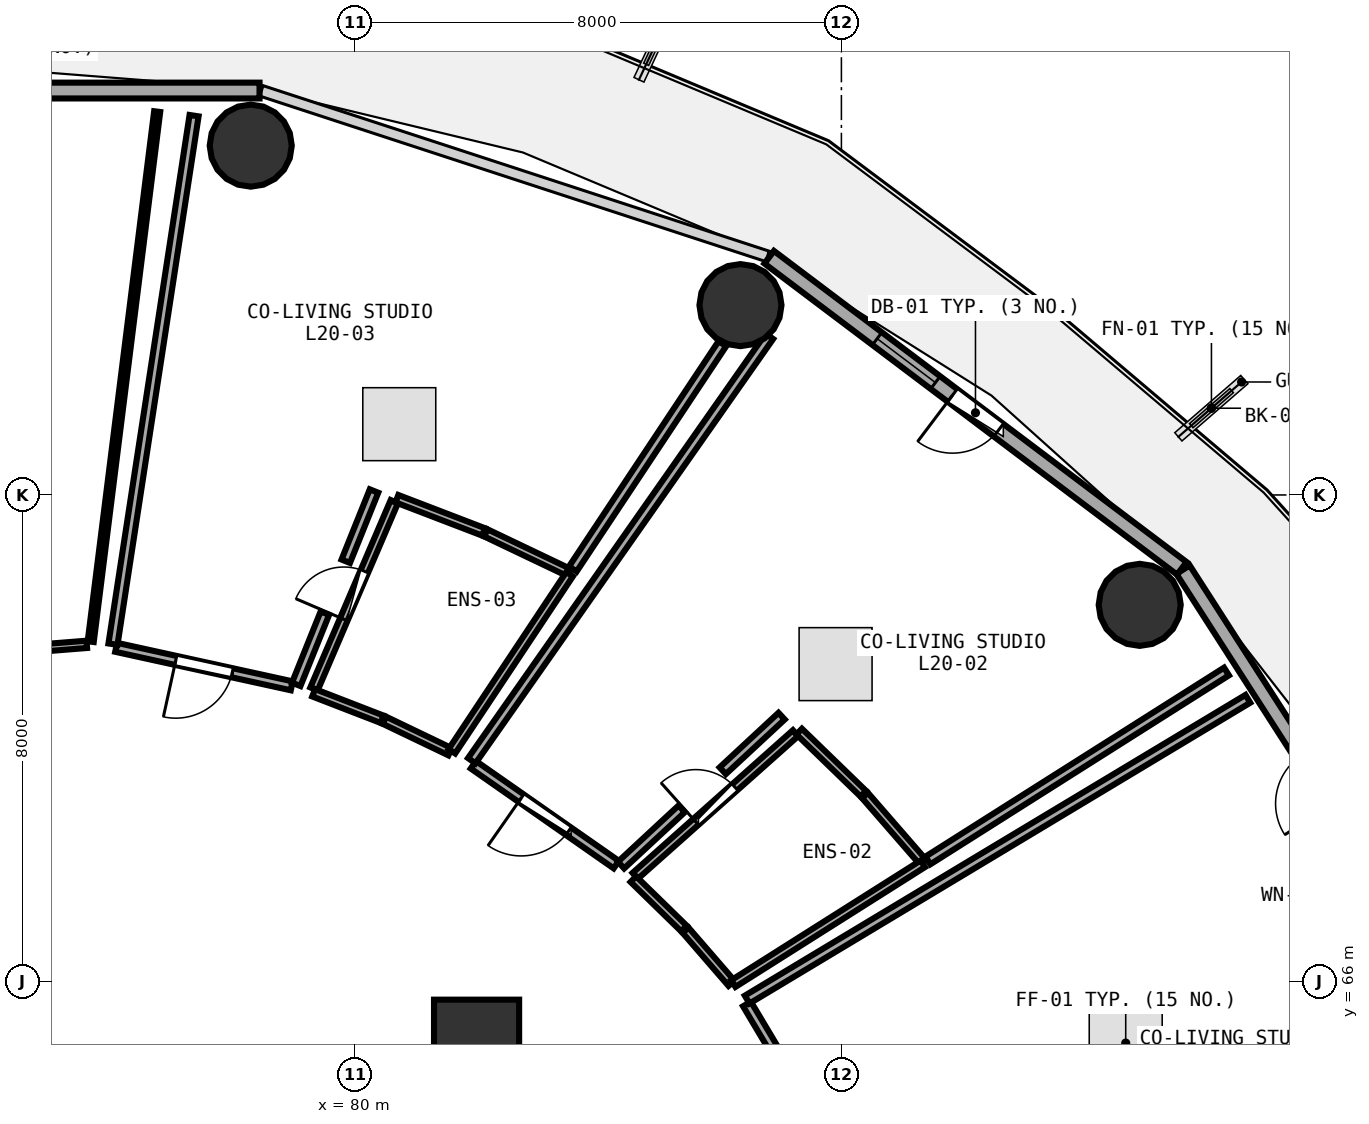
"""IFC4 building model, lengths in metres.
Left out: names, types, materials, properties, quantities, classifications, styles, units other than length and angle.
Written with IfcOpenShell. Run it as: python <this file> out.ifc"""

import sys

from ifc_helpers import new_model, si_unit, direction, frame, frame_2d, origin, origin_2d, place, context, subcontext, project, spatial, rectangle, circle, extrude, element, fill, save


model = new_model("IFC4")
c1 = context("Model", 3, precision=1e-05, world=origin(), true_north=direction((0.0, 1.0)))
c2 = subcontext(c1, "Body", "Model", "MODEL_VIEW")
j1 = project(units=[si_unit("LENGTHUNIT", "METRE"), si_unit("PLANEANGLEUNIT", "RADIAN")], contexts=[c1])
p1 = place(None, origin())
s1 = spatial("IfcSite", under=j1, at=p1, CompositionType="ELEMENT")
p2 = place(p1, origin())
s2 = spatial("IfcBuilding", under=s1, at=p2, CompositionType="ELEMENT")
p3 = place(p2, frame((0.0, 0.0, 80.1)))
s3 = spatial("IfcBuildingStorey", under=s2, at=p3, CompositionType="ELEMENT", Elevation=80.1)
p4 = place(p3, frame((82.0, 65.0, 0.0), z_axis=(0.0, 0.0, 1.0), x_axis=(1.0, 0.0, 0.0)))
e1 = element("IfcColumn", 1, at=p4, inside=s3, PredefinedType="PILASTER", context=c2, shape_type="SweptSolid", body=[
    extrude(rectangle(XDim=1.4, YDim=1.4, at=origin_2d()), origin(), (0.0, 0.0, 1.0), 3.75),
])
for number, where, z_axis, x_axis in (
    (2, (92.906, 72.193, 0.0), (0.0, 0.0, 1.0), (1.0, 0.0, 0.0)),
    (3, (86.34, 77.122, 0.0), (0.0, 0.0, 1.0), (1.0, 0.0, 0.0)),
    (4, (78.286, 79.745, 0.0), (0.0, 0.0, 1.0), (1.0, 0.0, 0.0)),
):
    element("IfcColumn", number, at=place(p3, frame(where, z_axis=z_axis, x_axis=x_axis)), inside=s3, PredefinedType="COLUMN", context=c2, shape_type="SweptSolid", body=[
        extrude(circle(Radius=0.675, at=origin_2d()), origin(), (0.0, 0.0, 1.0), 3.75),
    ])
p5 = place(p3, frame((98.048, 65.879, 0.0), z_axis=(0.0, 0.0, 1.0), x_axis=(-0.540620528459, 0.841266571432, 0.0)))
e5 = element("IfcWall", 5, at=p5, inside=s3, PredefinedType="SOLIDWALL", context=c2, shape_type="SweptSolid", body=[
    extrude(rectangle(XDim=8.193, YDim=0.26, at=frame_2d((4.096, 0.0))), origin(), (0.0, 0.0, 1.0), 3.475),
])
p6 = place(p5, frame((3.621, 0.0, 0.0)))
e6 = element("IfcOpeningElement", 6, at=p6, cuts=e5, PredefinedType="OPENING", context=c2, shape_type="SweptSolid", body=[
    extrude(rectangle(XDim=0.95, YDim=2.1, at=frame_2d((0.475, 1.05))), frame((0.0, 0.14, 0.0), z_axis=(0.0, -1.0, 0.0), x_axis=(1.0, 0.0, 0.0)), (0.0, 0.0, 1.0), 0.28),
])
p7 = place(p5, frame((2.041, 0.0, 0.85)))
e7 = element("IfcOpeningElement", 7, at=p7, cuts=e5, PredefinedType="OPENING", context=c2, shape_type="SweptSolid", body=[
    extrude(rectangle(XDim=1.2, YDim=1.45, at=frame_2d((0.6, 0.725))), frame((0.0, 0.14, 0.0), z_axis=(0.0, -1.0, 0.0), x_axis=(1.0, 0.0, 0.0)), (0.0, 0.0, 1.0), 0.28),
])
p8 = place(p3, frame((93.599, 72.793, 0.0), z_axis=(0.0, 0.0, 1.0), x_axis=(-0.798501507879, 0.601992808857, 0.0)))
e8 = element("IfcWall", 8, at=p8, inside=s3, PredefinedType="SOLIDWALL", context=c2, shape_type="SweptSolid", body=[
    extrude(rectangle(XDim=8.499, YDim=0.26, at=frame_2d((4.25, 0.0))), origin(), (0.0, 0.0, 1.0), 3.475),
])
p9 = place(p8, frame((3.775, 0.0, 0.0)))
e9 = element("IfcOpeningElement", 9, at=p9, cuts=e8, PredefinedType="OPENING", context=c2, shape_type="SweptSolid", body=[
    extrude(rectangle(XDim=0.95, YDim=2.1, at=frame_2d((0.475, 1.05))), frame((0.0, 0.14, 0.0), z_axis=(0.0, -1.0, 0.0), x_axis=(1.0, 0.0, 0.0)), (0.0, 0.0, 1.0), 0.28),
])
p10 = place(p8, frame((5.075, 0.0, 0.85)))
e10 = element("IfcOpeningElement", 10, at=p10, cuts=e8, PredefinedType="OPENING", context=c2, shape_type="SweptSolid", body=[
    extrude(rectangle(XDim=1.2, YDim=1.45, at=frame_2d((0.6, 0.725))), frame((0.0, 0.14, 0.0), z_axis=(0.0, -1.0, 0.0), x_axis=(1.0, 0.0, 0.0)), (0.0, 0.0, 1.0), 0.28),
])
p11 = place(p3, frame((78.43, 80.651, 0.0), z_axis=(0.0, 0.0, 1.0), x_axis=(-1.0, 0.0, 0.0)))
e11 = element("IfcWall", 11, at=p11, inside=s3, PredefinedType="SOLIDWALL", context=c2, shape_type="SweptSolid", body=[
    extrude(rectangle(XDim=8.861, YDim=0.26, at=frame_2d((4.43, 0.0))), origin(), (0.0, 0.0, 1.0), 3.475),
])
p12 = place(p11, frame((3.63, 0.0, 0.85)))
e12 = element("IfcOpeningElement", 12, at=p12, cuts=e11, PredefinedType="OPENING", context=c2, shape_type="SweptSolid", body=[
    extrude(rectangle(XDim=1.6, YDim=1.45, at=frame_2d((0.8, 0.725))), frame((0.0, 0.14, 0.0), z_axis=(0.0, -1.0, 0.0), x_axis=(1.0, 0.0, 0.0)), (0.0, 0.0, 1.0), 0.28),
])
p13 = place(p3, frame((87.856, 63.267, 0.0), z_axis=(0.0, 0.0, 1.0), x_axis=(-0.512288635556, 0.858813340535, 0.0)))
e13 = element("IfcWall", 13, at=p13, inside=s3, PredefinedType="PARTITIONING", context=c2, shape_type="SweptSolid", body=[
    extrude(rectangle(XDim=2.751, YDim=0.15, at=frame_2d((1.375, 0.0))), origin(), (0.0, 0.0, 1.0), 2.925),
])
p14 = place(p13, frame((0.901, 0.0, 0.0)))
e14 = element("IfcOpeningElement", 14, at=p14, cuts=e13, PredefinedType="OPENING", context=c2, shape_type="SweptSolid", body=[
    extrude(rectangle(XDim=0.95, YDim=2.08, at=frame_2d((0.475, 1.04))), frame((0.0, 0.085, 0.0), z_axis=(0.0, -1.0, 0.0), x_axis=(1.0, 0.0, 0.0)), (0.0, 0.0, 1.0), 0.17),
])
p15 = place(p3, frame((84.609, 67.736, 0.0), z_axis=(0.0, 0.0, 1.0), x_axis=(0.746989483068, 0.664835853565, 0.0)))
e15 = element("IfcWall", 15, at=p15, inside=s3, PredefinedType="PLUMBINGWALL", context=c2, shape_type="SweptSolid", body=[
    extrude(rectangle(XDim=3.531, YDim=0.13, at=frame_2d((1.765, 0.0))), origin(), (0.0, 0.0, 1.0), 3.175),
])
p16 = place(p15, frame((1.335, 0.0, 0.0)))
e16 = element("IfcOpeningElement", 16, at=p16, cuts=e15, PredefinedType="OPENING", context=c2, shape_type="SweptSolid", body=[
    extrude(rectangle(XDim=0.86, YDim=2.05, at=frame_2d((0.43, 1.025))), frame((0.0, 0.075, 0.0), z_axis=(0.0, -1.0, 0.0), x_axis=(1.0, 0.0, 0.0)), (0.0, 0.0, 1.0), 0.15),
])
p17 = place(p3, frame((84.298, 67.92, 0.0), z_axis=(0.0, 0.0, 1.0), x_axis=(-0.819775565256, 0.572684924378, 0.0)))
e17 = element("IfcWall", 17, at=p17, inside=s3, PredefinedType="PARTITIONING", context=c2, shape_type="SweptSolid", body=[
    extrude(rectangle(XDim=2.867, YDim=0.15, at=frame_2d((1.434, 0.0))), origin(), (0.0, 0.0, 1.0), 2.925),
])
p18 = place(p17, frame((0.959, 0.0, 0.0)))
e18 = element("IfcOpeningElement", 18, at=p18, cuts=e17, PredefinedType="OPENING", context=c2, shape_type="SweptSolid", body=[
    extrude(rectangle(XDim=0.95, YDim=2.08, at=frame_2d((0.475, 1.04))), frame((0.0, 0.085, 0.0), z_axis=(0.0, -1.0, 0.0), x_axis=(1.0, 0.0, 0.0)), (0.0, 0.0, 1.0), 0.17),
])
p19 = place(p3, frame((79.326, 70.809, 0.0), z_axis=(0.0, 0.0, 1.0), x_axis=(0.394174106006, 0.919035785024, 0.0)))
e19 = element("IfcWall", 19, at=p19, inside=s3, PredefinedType="PLUMBINGWALL", context=c2, shape_type="SweptSolid", body=[
    extrude(rectangle(XDim=3.353, YDim=0.13, at=frame_2d((1.677, 0.0))), origin(), (0.0, 0.0, 1.0), 2.925),
])
p20 = place(p19, frame((1.247, 0.0, 0.0)))
e20 = element("IfcOpeningElement", 20, at=p20, cuts=e19, PredefinedType="OPENING", context=c2, shape_type="SweptSolid", body=[
    extrude(rectangle(XDim=0.86, YDim=2.05, at=frame_2d((0.43, 1.025))), frame((0.0, 0.075, 0.0), z_axis=(0.0, -1.0, 0.0), x_axis=(1.0, 0.0, 0.0)), (0.0, 0.0, 1.0), 0.15),
])
p21 = place(p3, frame((78.96, 70.861, 0.0), z_axis=(0.0, 0.0, 1.0), x_axis=(-0.976789452363, 0.214201694093, 0.0)))
e21 = element("IfcWall", 21, at=p21, inside=s3, PredefinedType="PARTITIONING", context=c2, shape_type="SweptSolid", body=[
    extrude(rectangle(XDim=2.957, YDim=0.15, at=frame_2d((1.478, 0.0))), origin(), (0.0, 0.0, 1.0), 3.48),
])
p22 = place(p21, frame((1.003, 0.0, 0.0)))
e22 = element("IfcOpeningElement", 22, at=p22, cuts=e21, PredefinedType="OPENING", context=c2, shape_type="SweptSolid", body=[
    extrude(rectangle(XDim=0.95, YDim=2.08, at=frame_2d((0.475, 1.04))), frame((0.0, 0.085, 0.0), z_axis=(0.0, -1.0, 0.0), x_axis=(1.0, 0.0, 0.0)), (0.0, 0.0, 1.0), 0.17),
])
p23 = place(p3, frame((75.589, 71.543, 0.0), z_axis=(0.0, 0.0, 1.0), x_axis=(-0.996863165686, -0.079144354814, 0.0)))
e23 = element("IfcWall", 23, at=p23, inside=s3, PredefinedType="PARTITIONING", context=c2, shape_type="SweptSolid", body=[
    extrude(rectangle(XDim=5.765, YDim=0.12, at=frame_2d((2.883, 0.0))), origin(), (0.0, 0.0, 1.0), 2.925),
])
p24 = place(p23, frame((2.433, 0.0, 0.0)))
e24 = element("IfcOpeningElement", 24, at=p24, cuts=e23, PredefinedType="OPENING", context=c2, shape_type="SweptSolid", body=[
    extrude(rectangle(XDim=0.9, YDim=2.08, at=frame_2d((0.45, 1.04))), frame((0.0, 0.07, 0.0), z_axis=(0.0, -1.0, 0.0), x_axis=(1.0, 0.0, 0.0)), (0.0, 0.0, 1.0), 0.14),
])
p25 = place(p3, frame((86.45, 65.702, 0.0), z_axis=(0.0, 0.0, 1.0), x_axis=(0.857261851198, 0.514880683731, 0.0)))
e25 = element("IfcWall", 25, at=p25, inside=s3, PredefinedType="PARTITIONING", context=c2, shape_type="SweptSolid", body=[
    extrude(rectangle(XDim=9.606, YDim=0.15, at=frame_2d((4.803, 0.0))), origin(), (0.0, 0.0, 1.0), 2.975),
])
p26 = place(p3, frame((86.193, 65.969, 0.0), z_axis=(0.0, 0.0, 1.0), x_axis=(-0.654583900851, 0.755989362853, 0.0)))
e26 = element("IfcWall", 26, at=p26, inside=s3, PredefinedType="PLUMBINGWALL", context=c2, shape_type="SweptSolid", body=[
    extrude(rectangle(XDim=1.153, YDim=0.13, at=frame_2d((0.577, 0.0))), origin(), (0.0, 0.0, 1.0), 3.48),
])
p27 = place(p3, frame((85.411, 66.87, 0.0), z_axis=(0.0, 0.0, 1.0), x_axis=(-0.715871547002, 0.698232001696, 0.0)))
e27 = element("IfcWall", 27, at=p27, inside=s3, PredefinedType="PLUMBINGWALL", context=c2, shape_type="SweptSolid", body=[
    extrude(rectangle(XDim=1.163, YDim=0.13, at=frame_2d((0.581, 0.0))), origin(), (0.0, 0.0, 1.0), 2.925),
])
p28 = place(p3, frame((87.305, 70.109, 0.0), z_axis=(0.0, 0.0, 1.0), x_axis=(0.718235032224, -0.69580057379, 0.0)))
e28 = element("IfcWall", 28, at=p28, inside=s3, PredefinedType="PLUMBINGWALL", context=c2, shape_type="SweptSolid", body=[
    extrude(rectangle(XDim=1.469, YDim=0.13, at=frame_2d((0.735, 0.0))), origin(), (0.0, 0.0, 1.0), 2.925),
])
p29 = place(p3, frame((88.388, 69.058, 0.0), z_axis=(0.0, 0.0, 1.0), x_axis=(0.656315808405, -0.754486288568, 0.0)))
e29 = element("IfcWall", 29, at=p29, inside=s3, PredefinedType="PLUMBINGWALL", context=c2, shape_type="SweptSolid", body=[
    extrude(rectangle(XDim=1.455, YDim=0.13, at=frame_2d((0.728, 0.0))), origin(), (0.0, 0.0, 1.0), 2.925),
])
p30 = place(p3, frame((89.339, 67.934, 0.0), z_axis=(0.0, 0.0, 1.0), x_axis=(-0.845293712827, -0.53430191751, 0.0)))
e30 = element("IfcWall", 30, at=p30, inside=s3, PredefinedType="PLUMBINGWALL", context=c2, shape_type="SweptSolid", body=[
    extrude(rectangle(XDim=3.687, YDim=0.13, at=frame_2d((1.843, 0.0))), origin(), (0.0, 0.0, 1.0), 3.175),
])
p31 = place(p3, frame((81.921, 69.63, 0.0), z_axis=(0.0, 0.0, 1.0), x_axis=(0.574246298275, 0.818682593511, 0.0)))
e31 = element("IfcWall", 31, at=p31, inside=s3, PredefinedType="PARTITIONING", context=c2, shape_type="SweptSolid", body=[
    extrude(rectangle(XDim=8.525, YDim=0.15, at=frame_2d((4.262, 0.0))), origin(), (0.0, 0.0, 1.0), 2.925),
])
p32 = place(p3, frame((94.333, 71.097, 0.0), z_axis=(0.0, 0.0, 1.0), x_axis=(-0.845032344767, -0.534715191759, 0.0)))
e32 = element("IfcWall", 32, at=p32, inside=s3, PredefinedType="PARTITIONING", context=c2, shape_type="SweptSolid", body=[
    extrude(rectangle(XDim=5.811, YDim=0.15, at=frame_2d((2.905, 0.0))), origin(), (0.0, 0.0, 1.0), 2.975),
])
p33 = place(p3, frame((87.017, 70.363, 0.0), z_axis=(0.0, 0.0, 1.0), x_axis=(-0.733142432265, -0.680075123801, 0.0)))
e33 = element("IfcWall", 33, at=p33, inside=s3, PredefinedType="PARTITIONING", context=c2, shape_type="SweptSolid", body=[
    extrude(rectangle(XDim=1.32, YDim=0.15, at=frame_2d((0.66, 0.0))), origin(), (0.0, 0.0, 1.0), 3.175),
])
p34 = place(p3, frame((85.374, 68.839, 0.0), z_axis=(0.0, 0.0, 1.0), x_axis=(-0.733068131904, -0.680155213159, 0.0)))
e34 = element("IfcWall", 34, at=p34, inside=s3, PredefinedType="PARTITIONING", context=c2, shape_type="SweptSolid", body=[
    extrude(rectangle(XDim=1.361, YDim=0.15, at=frame_2d((0.681, 0.0))), origin(), (0.0, 0.0, 1.0), 3.235),
])
p35 = place(p3, frame((81.565, 69.777, 0.0), z_axis=(0.0, 0.0, 1.0), x_axis=(-0.901710288712, 0.432340785991, 0.0)))
e35 = element("IfcWall", 35, at=p35, inside=s3, PredefinedType="PLUMBINGWALL", context=c2, shape_type="SweptSolid", body=[
    extrude(rectangle(XDim=1.2, YDim=0.13, at=frame_2d((0.6, 0.0))), origin(), (0.0, 0.0, 1.0), 2.925),
])
p36 = place(p3, frame((80.446, 70.311, 0.0), z_axis=(0.0, 0.0, 1.0), x_axis=(-0.932603244632, 0.360903294669, 0.0)))
e36 = element("IfcWall", 36, at=p36, inside=s3, PredefinedType="PLUMBINGWALL", context=c2, shape_type="SweptSolid", body=[
    extrude(rectangle(XDim=1.207, YDim=0.13, at=frame_2d((0.604, 0.0))), origin(), (0.0, 0.0, 1.0), 3.235),
])
p37 = place(p3, frame((80.69, 73.939, 0.0), z_axis=(0.0, 0.0, 1.0), x_axis=(0.933707809738, -0.358035928413, 0.0)))
e37 = element("IfcWall", 37, at=p37, inside=s3, PredefinedType="PLUMBINGWALL", context=c2, shape_type="SweptSolid", body=[
    extrude(rectangle(XDim=1.527, YDim=0.13, at=frame_2d((0.763, 0.0))), origin(), (0.0, 0.0, 1.0), 3.48),
])
p38 = place(p3, frame((82.152, 73.376, 0.0), z_axis=(0.0, 0.0, 1.0), x_axis=(0.902598876691, -0.430482598714, 0.0)))
e38 = element("IfcWall", 38, at=p38, inside=s3, PredefinedType="PLUMBINGWALL", context=c2, shape_type="SweptSolid", body=[
    extrude(rectangle(XDim=1.519, YDim=0.13, at=frame_2d((0.759, 0.0))), origin(), (0.0, 0.0, 1.0), 3.175),
])
p39 = place(p3, frame((83.53, 72.697, 0.0), z_axis=(0.0, 0.0, 1.0), x_axis=(-0.553523611894, -0.832833483402, 0.0)))
e39 = element("IfcWall", 39, at=p39, inside=s3, PredefinedType="PLUMBINGWALL", context=c2, shape_type="SweptSolid", body=[
    extrude(rectangle(XDim=3.497, YDim=0.13, at=frame_2d((1.749, 0.0))), origin(), (0.0, 0.0, 1.0), 3.175),
])
p40 = place(p3, frame((76.02, 71.546, 0.0), z_axis=(0.0, 0.0, 1.0), x_axis=(0.151710828081, 0.988424921096, 0.0)))
e40 = element("IfcWall", 40, at=p40, inside=s3, PredefinedType="PARTITIONING", context=c2, shape_type="SweptSolid", body=[
    extrude(rectangle(XDim=8.793, YDim=0.15, at=frame_2d((4.396, 0.0))), origin(), (0.0, 0.0, 1.0), 2.975),
])
p41 = place(p3, frame((86.043, 76.488, 0.0), z_axis=(0.0, 0.0, 1.0), x_axis=(-0.553014365691, -0.833171717799, 0.0)))
e41 = element("IfcWall", 41, at=p41, inside=s3, PredefinedType="PARTITIONING", context=c2, shape_type="SweptSolid", body=[
    extrude(rectangle(XDim=4.448, YDim=0.15, at=frame_2d((2.224, 0.0))), origin(), (0.0, 0.0, 1.0), 2.925),
])
p42 = place(p3, frame((80.313, 74.065, 0.0), z_axis=(0.0, 0.0, 1.0), x_axis=(-0.373249856729, -0.927730857766, 0.0)))
e42 = element("IfcWall", 42, at=p42, inside=s3, PredefinedType="PARTITIONING", context=c2, shape_type="SweptSolid", body=[
    extrude(rectangle(XDim=1.245, YDim=0.15, at=frame_2d((0.622, 0.0))), origin(), (0.0, 0.0, 1.0), 2.925),
])
p43 = place(p3, frame((79.505, 72.056, 0.0), z_axis=(0.0, 0.0, 1.0), x_axis=(-0.373190252803, -0.927754835726, 0.0)))
e43 = element("IfcWall", 43, at=p43, inside=s3, PredefinedType="PARTITIONING", context=c2, shape_type="SweptSolid", body=[
    extrude(rectangle(XDim=1.263, YDim=0.15, at=frame_2d((0.631, 0.0))), origin(), (0.0, 0.0, 1.0), 3.48),
])
p44 = place(p3, frame((76.747, 80.304, 0.0), z_axis=(0.0, 0.0, 1.0), x_axis=(-0.124421236745, -0.992229487491, 0.0)))
e44 = element("IfcWall", 44, at=p44, inside=s3, PredefinedType="PARTITIONING", context=c2, shape_type="SweptSolid", body=[
    extrude(rectangle(XDim=8.785, YDim=0.1, at=frame_2d((4.393, 0.0))), origin(), (0.0, 0.0, 1.0), 2.975),
])
p45 = place(p9, frame((0.95, 0.0, 0.0), z_axis=(0.0, 0.0, 1.0), x_axis=(-1.0, 0.0, 0.0)))
e45 = element("IfcDoor", 45, at=p45, inside=s3, OperationType="SINGLE_SWING_LEFT", PredefinedType="DOOR", context=c2, shape_type="SweptSolid", body=[
    extrude(rectangle(XDim=0.95, YDim=2.1, at=frame_2d((0.475, 1.05))), frame((0.0, 0.025, 0.0), z_axis=(0.0, -1.0, 0.0), x_axis=(1.0, 0.0, 0.0)), (0.0, 0.0, 1.0), 0.05),
])
fill(e9, e45)
p46 = place(p10, origin())
e46 = element("IfcWindow", 46, at=p46, inside=s3, PartitioningType="SINGLE_PANEL", PredefinedType="WINDOW", context=c2, shape_type="SweptSolid", body=[
    extrude(rectangle(XDim=1.2, YDim=1.45, at=frame_2d((0.6, 0.725))), frame((0.0, 0.03, 0.0), z_axis=(0.0, -1.0, 0.0), x_axis=(1.0, 0.0, 0.0)), (0.0, 0.0, 1.0), 0.06),
])
fill(e10, e46)
p47 = place(p16, origin())
e47 = element("IfcDoor", 47, at=p47, inside=s3, OperationType="SINGLE_SWING_LEFT", PredefinedType="DOOR", context=c2, shape_type="SweptSolid", body=[
    extrude(rectangle(XDim=0.86, YDim=2.05, at=frame_2d((0.43, 1.025))), frame((0.0, 0.025, 0.0), z_axis=(0.0, -1.0, 0.0), x_axis=(1.0, 0.0, 0.0)), (0.0, 0.0, 1.0), 0.05),
])
fill(e16, e47)
p48 = place(p18, origin())
e48 = element("IfcDoor", 48, at=p48, inside=s3, OperationType="SINGLE_SWING_RIGHT", PredefinedType="DOOR", context=c2, shape_type="SweptSolid", body=[
    extrude(rectangle(XDim=0.95, YDim=2.08, at=frame_2d((0.475, 1.04))), frame((0.0, 0.025, 0.0), z_axis=(0.0, -1.0, 0.0), x_axis=(1.0, 0.0, 0.0)), (0.0, 0.0, 1.0), 0.05),
])
fill(e18, e48)
p49 = place(p20, origin())
e49 = element("IfcDoor", 49, at=p49, inside=s3, OperationType="SINGLE_SWING_LEFT", PredefinedType="DOOR", context=c2, shape_type="SweptSolid", body=[
    extrude(rectangle(XDim=0.86, YDim=2.05, at=frame_2d((0.43, 1.025))), frame((0.0, 0.025, 0.0), z_axis=(0.0, -1.0, 0.0), x_axis=(1.0, 0.0, 0.0)), (0.0, 0.0, 1.0), 0.05),
])
fill(e20, e49)
p50 = place(p22, origin())
e50 = element("IfcDoor", 50, at=p50, inside=s3, OperationType="SINGLE_SWING_RIGHT", PredefinedType="DOOR", context=c2, shape_type="SweptSolid", body=[
    extrude(rectangle(XDim=0.95, YDim=2.08, at=frame_2d((0.475, 1.04))), frame((0.0, 0.025, 0.0), z_axis=(0.0, -1.0, 0.0), x_axis=(1.0, 0.0, 0.0)), (0.0, 0.0, 1.0), 0.05),
])
fill(e22, e50)
save(model, sys.argv[1])
